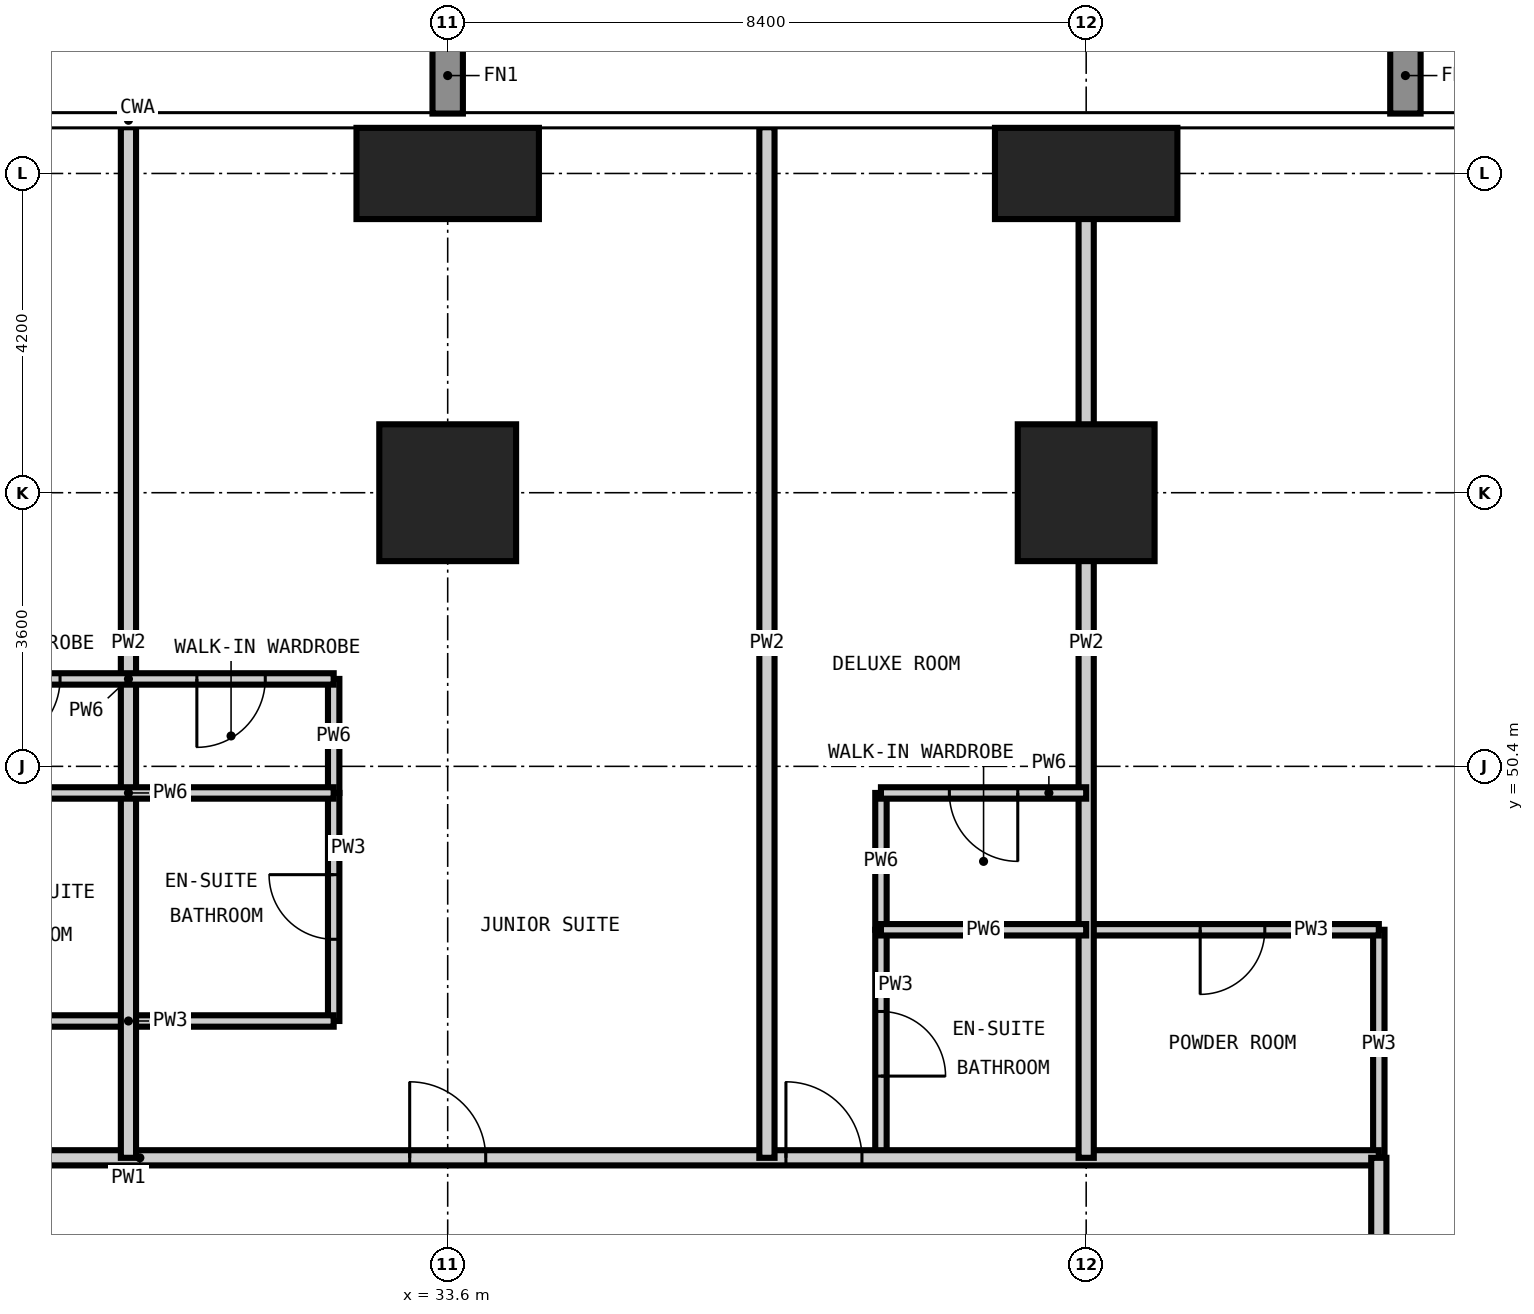
"""IFC4 building model, lengths in metres.
Left out: names, types, materials, properties, quantities, classifications, styles, units other than length and angle.
Written with IfcOpenShell. Run it as: python <this file> out.ifc"""

import sys

from ifc_helpers import new_model, si_unit, direction, frame, frame_2d, origin, origin_2d, place, context, subcontext, project, spatial, rectangle, extrude, element, fill, save


model = new_model("IFC4")
c1 = context("Model", 3, precision=1e-05, world=origin(), true_north=direction((0.0, 1.0)))
c2 = subcontext(c1, "Body", "Model", "MODEL_VIEW")
j1 = project(units=[si_unit("LENGTHUNIT", "METRE"), si_unit("PLANEANGLEUNIT", "RADIAN")], contexts=[c1])
p1 = place(None, origin())
s1 = spatial("IfcSite", under=j1, at=p1, CompositionType="ELEMENT")
p2 = place(p1, origin())
s2 = spatial("IfcBuilding", under=s1, at=p2, CompositionType="ELEMENT")
p3 = place(p2, frame((0.0, 0.0, 34.2)))
s3 = spatial("IfcBuildingStorey", under=s2, at=p3, CompositionType="ELEMENT", Elevation=34.2)
p4 = place(p3, frame((33.6, 54.0, -0.35), z_axis=(0.0, 0.0, 1.0), x_axis=(1.0, 0.0, 0.0)))
e1 = element("IfcColumn", 1, at=p4, inside=s3, PredefinedType="COLUMN", context=c2, shape_type="SweptSolid", body=[
    extrude(rectangle(XDim=1.8, YDim=1.8, at=origin_2d()), origin(), (0.0, 0.0, 1.0), 3.6),
])
p5 = place(p3, frame((33.6, 58.2, -0.35), z_axis=(0.0, 0.0, 1.0), x_axis=(1.0, 0.0, 0.0)))
e2 = element("IfcColumn", 2, at=p5, inside=s3, PredefinedType="COLUMN", context=c2, shape_type="SweptSolid", body=[
    extrude(rectangle(XDim=2.4, YDim=1.2, at=origin_2d()), origin(), (0.0, 0.0, 1.0), 3.6),
])
p6 = place(p3, frame((42.0, 54.0, -0.35), z_axis=(0.0, 0.0, 1.0), x_axis=(1.0, 0.0, 0.0)))
e3 = element("IfcColumn", 3, at=p6, inside=s3, PredefinedType="COLUMN", context=c2, shape_type="SweptSolid", body=[
    extrude(rectangle(XDim=1.8, YDim=1.8, at=origin_2d()), origin(), (0.0, 0.0, 1.0), 3.6),
])
p7 = place(p3, frame((42.0, 58.2, -0.35), z_axis=(0.0, 0.0, 1.0), x_axis=(1.0, 0.0, 0.0)))
e4 = element("IfcColumn", 4, at=p7, inside=s3, PredefinedType="COLUMN", context=c2, shape_type="SweptSolid", body=[
    extrude(rectangle(XDim=2.4, YDim=1.2, at=origin_2d()), origin(), (0.0, 0.0, 1.0), 3.6),
])
p8 = place(p3, frame((32.1, 47.05, 0.0), z_axis=(0.0, 0.0, 1.0), x_axis=(0.0, 1.0, 0.0)))
e5 = element("IfcWall", 5, at=p8, inside=s3, PredefinedType="PARTITIONING", context=c2, shape_type="SweptSolid", body=[
    extrude(rectangle(XDim=3.0, YDim=0.15, at=frame_2d((1.5, 0.0))), origin(), (0.0, 0.0, 1.0), 3.25),
])
p9 = place(p8, frame((1.075, 0.0, 0.0)))
e6 = element("IfcOpeningElement", 6, at=p9, cuts=e5, PredefinedType="OPENING", context=c2, shape_type="SweptSolid", body=[
    extrude(rectangle(XDim=0.85, YDim=2.1, at=frame_2d((0.425, 1.05))), frame((0.0, 0.085, 0.0), z_axis=(0.0, -1.0, 0.0), x_axis=(1.0, 0.0, 0.0)), (0.0, 0.0, 1.0), 0.17),
])
p10 = place(p3, frame((39.3, 45.25, 0.0), z_axis=(0.0, 0.0, 1.0), x_axis=(0.0, 1.0, 0.0)))
e7 = element("IfcWall", 7, at=p10, inside=s3, PredefinedType="PARTITIONING", context=c2, shape_type="SweptSolid", body=[
    extrude(rectangle(XDim=3.0, YDim=0.15, at=frame_2d((1.5, 0.0))), origin(), (0.0, 0.0, 1.0), 3.25),
])
p11 = place(p10, frame((1.075, 0.0, 0.0)))
e8 = element("IfcOpeningElement", 8, at=p11, cuts=e7, PredefinedType="OPENING", context=c2, shape_type="SweptSolid", body=[
    extrude(rectangle(XDim=0.85, YDim=2.1, at=frame_2d((0.425, 1.05))), frame((0.0, 0.085, 0.0), z_axis=(0.0, -1.0, 0.0), x_axis=(1.0, 0.0, 0.0)), (0.0, 0.0, 1.0), 0.17),
])
p12 = place(p3, frame((45.85, 45.25, 0.0), z_axis=(0.0, 0.0, 1.0), x_axis=(0.0, 1.0, 0.0)))
e9 = element("IfcWall", 9, at=p12, inside=s3, PredefinedType="PARTITIONING", context=c2, shape_type="SweptSolid", body=[
    extrude(rectangle(XDim=3.0, YDim=0.15, at=frame_2d((1.5, 0.0))), origin(), (0.0, 0.0, 1.0), 3.25),
])
p13 = place(p3, frame((26.7, 47.05, 0.0), z_axis=(0.0, 0.0, 1.0), x_axis=(1.0, 0.0, 0.0)))
e10 = element("IfcWall", 10, at=p13, inside=s3, PredefinedType="PARTITIONING", context=c2, shape_type="SweptSolid", body=[
    extrude(rectangle(XDim=5.4, YDim=0.15, at=frame_2d((2.7, 0.0))), origin(), (0.0, 0.0, 1.0), 3.25),
])
p14 = place(p3, frame((42.0, 48.25, 0.0), z_axis=(0.0, 0.0, 1.0), x_axis=(1.0, 0.0, 0.0)))
e11 = element("IfcWall", 11, at=p14, inside=s3, PredefinedType="PARTITIONING", context=c2, shape_type="SweptSolid", body=[
    extrude(rectangle(XDim=3.85, YDim=0.15, at=frame_2d((1.925, 0.0))), origin(), (0.0, 0.0, 1.0), 3.25),
])
p15 = place(p14, frame((1.5, 0.0, 0.0)))
e12 = element("IfcOpeningElement", 12, at=p15, cuts=e11, PredefinedType="OPENING", context=c2, shape_type="SweptSolid", body=[
    extrude(rectangle(XDim=0.85, YDim=2.1, at=frame_2d((0.425, 1.05))), frame((0.0, 0.085, 0.0), z_axis=(0.0, -1.0, 0.0), x_axis=(1.0, 0.0, 0.0)), (0.0, 0.0, 1.0), 0.17),
])
p16 = place(p3, frame((13.25, 45.25, 0.0), z_axis=(0.0, 0.0, 1.0), x_axis=(1.0, 0.0, 0.0)))
e13 = element("IfcWall", 13, at=p16, inside=s3, PredefinedType="PARTITIONING", context=c2, shape_type="SweptSolid", body=[
    extrude(rectangle(XDim=32.6, YDim=0.2, at=frame_2d((16.3, 0.0))), origin(), (0.0, 0.0, 1.0), 3.25),
])
p17 = place(p16, frame((6.5, 0.0, 0.0)))
e14 = element("IfcOpeningElement", 14, at=p17, cuts=e13, PredefinedType="OPENING", context=c2, shape_type="SweptSolid", body=[
    extrude(rectangle(XDim=1.0, YDim=2.2, at=frame_2d((0.5, 1.1))), frame((0.0, 0.11, 0.0), z_axis=(0.0, -1.0, 0.0), x_axis=(1.0, 0.0, 0.0)), (0.0, 0.0, 1.0), 0.22),
])
p18 = place(p16, frame((11.45, 0.0, 0.0)))
e15 = element("IfcOpeningElement", 15, at=p18, cuts=e13, PredefinedType="OPENING", context=c2, shape_type="SweptSolid", body=[
    extrude(rectangle(XDim=1.0, YDim=2.2, at=frame_2d((0.5, 1.1))), frame((0.0, 0.11, 0.0), z_axis=(0.0, -1.0, 0.0), x_axis=(1.0, 0.0, 0.0)), (0.0, 0.0, 1.0), 0.22),
])
p19 = place(p16, frame((19.85, 0.0, 0.0)))
e16 = element("IfcOpeningElement", 16, at=p19, cuts=e13, PredefinedType="OPENING", context=c2, shape_type="SweptSolid", body=[
    extrude(rectangle(XDim=1.0, YDim=2.2, at=frame_2d((0.5, 1.1))), frame((0.0, 0.11, 0.0), z_axis=(0.0, -1.0, 0.0), x_axis=(1.0, 0.0, 0.0)), (0.0, 0.0, 1.0), 0.22),
])
p20 = place(p16, frame((24.8, 0.0, 0.0)))
e17 = element("IfcOpeningElement", 17, at=p20, cuts=e13, PredefinedType="OPENING", context=c2, shape_type="SweptSolid", body=[
    extrude(rectangle(XDim=1.0, YDim=2.2, at=frame_2d((0.5, 1.1))), frame((0.0, 0.11, 0.0), z_axis=(0.0, -1.0, 0.0), x_axis=(1.0, 0.0, 0.0)), (0.0, 0.0, 1.0), 0.22),
])
p21 = place(p3, frame((45.85, 45.25, 0.0), z_axis=(0.0, 0.0, 1.0), x_axis=(0.0, -1.0, 0.0)))
e18 = element("IfcWall", 18, at=p21, inside=s3, PredefinedType="PARTITIONING", context=c2, shape_type="SweptSolid", body=[
    extrude(rectangle(XDim=32.0, YDim=0.2, at=frame_2d((16.0, 0.0))), origin(), (0.0, 0.0, 1.0), 3.25),
])
p22 = place(p21, frame((23.75, 0.0, 0.0)))
e19 = element("IfcOpeningElement", 19, at=p22, cuts=e18, PredefinedType="OPENING", context=c2, shape_type="SweptSolid", body=[
    extrude(rectangle(XDim=1.0, YDim=2.2, at=frame_2d((0.5, 1.1))), frame((0.0, 0.11, 0.0), z_axis=(0.0, -1.0, 0.0), x_axis=(1.0, 0.0, 0.0)), (0.0, 0.0, 1.0), 0.22),
])
p23 = place(p21, frame((15.35, 0.0, 0.0)))
e20 = element("IfcOpeningElement", 20, at=p23, cuts=e18, PredefinedType="OPENING", context=c2, shape_type="SweptSolid", body=[
    extrude(rectangle(XDim=1.0, YDim=2.2, at=frame_2d((0.5, 1.1))), frame((0.0, 0.11, 0.0), z_axis=(0.0, -1.0, 0.0), x_axis=(1.0, 0.0, 0.0)), (0.0, 0.0, 1.0), 0.22),
])
p24 = place(p21, frame((6.95, 0.0, 0.0)))
e21 = element("IfcOpeningElement", 21, at=p24, cuts=e18, PredefinedType="OPENING", context=c2, shape_type="SweptSolid", body=[
    extrude(rectangle(XDim=1.0, YDim=2.2, at=frame_2d((0.5, 1.1))), frame((0.0, 0.11, 0.0), z_axis=(0.0, -1.0, 0.0), x_axis=(1.0, 0.0, 0.0)), (0.0, 0.0, 1.0), 0.22),
])
p25 = place(p21, frame((29.725, 0.0, 0.0)))
e22 = element("IfcOpeningElement", 22, at=p25, cuts=e18, PredefinedType="OPENING", context=c2, shape_type="SweptSolid", body=[
    extrude(rectangle(XDim=1.0, YDim=2.2, at=frame_2d((0.5, 1.1))), frame((0.0, 0.11, 0.0), z_axis=(0.0, -1.0, 0.0), x_axis=(1.0, 0.0, 0.0)), (0.0, 0.0, 1.0), 0.22),
])
p26 = place(p21, frame((1.125, 0.0, 0.0)))
e23 = element("IfcOpeningElement", 23, at=p26, cuts=e18, PredefinedType="OPENING", context=c2, shape_type="SweptSolid", body=[
    extrude(rectangle(XDim=1.0, YDim=2.2, at=frame_2d((0.5, 1.1))), frame((0.0, 0.11, 0.0), z_axis=(0.0, -1.0, 0.0), x_axis=(1.0, 0.0, 0.0)), (0.0, 0.0, 1.0), 0.22),
])
for number, where, z_axis, x_axis in (
    (24, (29.4, 45.25, 0.0), (0.0, 0.0, 1.0), (0.0, 1.0, 0.0)),
    (25, (37.8, 45.25, 0.0), (0.0, 0.0, 1.0), (0.0, 1.0, 0.0)),
    (26, (42.0, 45.25, 0.0), (0.0, 0.0, 1.0), (0.0, 1.0, 0.0)),
):
    element("IfcWall", number, at=place(p3, frame(where, z_axis=z_axis, x_axis=x_axis)), inside=s3, PredefinedType="PARTITIONING", context=c2, shape_type="SweptSolid", body=[
        extrude(rectangle(XDim=13.558, YDim=0.2, at=frame_2d((6.779, 0.0))), origin(), (0.0, 0.0, 1.0), 3.25),
    ])
p27 = place(p3, frame((32.1, 50.05, 0.0), z_axis=(0.0, 0.0, 1.0), x_axis=(0.0, 1.0, 0.0)))
e27 = element("IfcWall", 27, at=p27, inside=s3, PredefinedType="PARTITIONING", context=c2, shape_type="SweptSolid", body=[
    extrude(rectangle(XDim=1.5, YDim=0.15, at=frame_2d((0.75, 0.0))), origin(), (0.0, 0.0, 1.0), 3.25),
])
p28 = place(p3, frame((39.3, 48.25, 0.0), z_axis=(0.0, 0.0, 1.0), x_axis=(0.0, 1.0, 0.0)))
e28 = element("IfcWall", 28, at=p28, inside=s3, PredefinedType="PARTITIONING", context=c2, shape_type="SweptSolid", body=[
    extrude(rectangle(XDim=1.8, YDim=0.15, at=frame_2d((0.9, 0.0))), origin(), (0.0, 0.0, 1.0), 3.25),
])
p29 = place(p3, frame((39.3, 48.25, 0.0), z_axis=(0.0, 0.0, 1.0), x_axis=(1.0, 0.0, 0.0)))
e29 = element("IfcWall", 29, at=p29, inside=s3, PredefinedType="PARTITIONING", context=c2, shape_type="SweptSolid", body=[
    extrude(rectangle(XDim=2.7, YDim=0.15, at=frame_2d((1.35, 0.0))), origin(), (0.0, 0.0, 1.0), 3.25),
])
p30 = place(p3, frame((26.7, 50.05, 0.0), z_axis=(0.0, 0.0, 1.0), x_axis=(1.0, 0.0, 0.0)))
e30 = element("IfcWall", 30, at=p30, inside=s3, PredefinedType="PARTITIONING", context=c2, shape_type="SweptSolid", body=[
    extrude(rectangle(XDim=5.4, YDim=0.15, at=frame_2d((2.7, 0.0))), origin(), (0.0, 0.0, 1.0), 3.25),
])
p31 = place(p3, frame((39.3, 50.05, 0.0), z_axis=(0.0, 0.0, 1.0), x_axis=(1.0, 0.0, 0.0)))
e31 = element("IfcWall", 31, at=p31, inside=s3, PredefinedType="PARTITIONING", context=c2, shape_type="SweptSolid", body=[
    extrude(rectangle(XDim=2.7, YDim=0.15, at=frame_2d((1.35, 0.0))), origin(), (0.0, 0.0, 1.0), 3.25),
])
p32 = place(p31, frame((0.9, 0.0, 0.0)))
e32 = element("IfcOpeningElement", 32, at=p32, cuts=e31, PredefinedType="OPENING", context=c2, shape_type="SweptSolid", body=[
    extrude(rectangle(XDim=0.9, YDim=2.1, at=frame_2d((0.45, 1.05))), frame((0.0, 0.085, 0.0), z_axis=(0.0, -1.0, 0.0), x_axis=(1.0, 0.0, 0.0)), (0.0, 0.0, 1.0), 0.17),
])
p33 = place(p3, frame((26.7, 51.55, 0.0), z_axis=(0.0, 0.0, 1.0), x_axis=(1.0, 0.0, 0.0)))
e33 = element("IfcWall", 33, at=p33, inside=s3, PredefinedType="PARTITIONING", context=c2, shape_type="SweptSolid", body=[
    extrude(rectangle(XDim=5.4, YDim=0.15, at=frame_2d((2.7, 0.0))), origin(), (0.0, 0.0, 1.0), 3.25),
])
p34 = place(p33, frame((0.9, 0.0, 0.0)))
e34 = element("IfcOpeningElement", 34, at=p34, cuts=e33, PredefinedType="OPENING", context=c2, shape_type="SweptSolid", body=[
    extrude(rectangle(XDim=0.9, YDim=2.1, at=frame_2d((0.45, 1.05))), frame((0.0, 0.085, 0.0), z_axis=(0.0, -1.0, 0.0), x_axis=(1.0, 0.0, 0.0)), (0.0, 0.0, 1.0), 0.17),
])
p35 = place(p33, frame((3.6, 0.0, 0.0)))
e35 = element("IfcOpeningElement", 35, at=p35, cuts=e33, PredefinedType="OPENING", context=c2, shape_type="SweptSolid", body=[
    extrude(rectangle(XDim=0.9, YDim=2.1, at=frame_2d((0.45, 1.05))), frame((0.0, 0.085, 0.0), z_axis=(0.0, -1.0, 0.0), x_axis=(1.0, 0.0, 0.0)), (0.0, 0.0, 1.0), 0.17),
])
p36 = place(p34, frame((0.9, 0.0, 0.0), z_axis=(0.0, 0.0, 1.0), x_axis=(-1.0, 0.0, 0.0)))
e36 = element("IfcDoor", 36, at=p36, inside=s3, OperationType="SINGLE_SWING_RIGHT", PredefinedType="DOOR", context=c2, shape_type="SweptSolid", body=[
    extrude(rectangle(XDim=0.9, YDim=2.1, at=frame_2d((0.45, 1.05))), frame((0.0, 0.025, 0.0), z_axis=(0.0, -1.0, 0.0), x_axis=(1.0, 0.0, 0.0)), (0.0, 0.0, 1.0), 0.05),
])
fill(e34, e36)
p37 = place(p19, origin())
e37 = element("IfcDoor", 37, at=p37, inside=s3, OperationType="SINGLE_SWING_LEFT", PredefinedType="DOOR", context=c2, shape_type="SweptSolid", body=[
    extrude(rectangle(XDim=1.0, YDim=2.2, at=frame_2d((0.5, 1.1))), frame((0.0, 0.025, 0.0), z_axis=(0.0, -1.0, 0.0), x_axis=(1.0, 0.0, 0.0)), (0.0, 0.0, 1.0), 0.05),
])
fill(e16, e37)
p38 = place(p9, origin())
e38 = element("IfcDoor", 38, at=p38, inside=s3, OperationType="SINGLE_SWING_RIGHT", PredefinedType="DOOR", context=c2, shape_type="SweptSolid", body=[
    extrude(rectangle(XDim=0.85, YDim=2.1, at=frame_2d((0.425, 1.05))), frame((0.0, 0.025, 0.0), z_axis=(0.0, -1.0, 0.0), x_axis=(1.0, 0.0, 0.0)), (0.0, 0.0, 1.0), 0.05),
])
fill(e6, e38)
p39 = place(p35, frame((0.9, 0.0, 0.0), z_axis=(0.0, 0.0, 1.0), x_axis=(-1.0, 0.0, 0.0)))
e39 = element("IfcDoor", 39, at=p39, inside=s3, OperationType="SINGLE_SWING_RIGHT", PredefinedType="DOOR", context=c2, shape_type="SweptSolid", body=[
    extrude(rectangle(XDim=0.9, YDim=2.1, at=frame_2d((0.45, 1.05))), frame((0.0, 0.025, 0.0), z_axis=(0.0, -1.0, 0.0), x_axis=(1.0, 0.0, 0.0)), (0.0, 0.0, 1.0), 0.05),
])
fill(e35, e39)
p40 = place(p20, origin())
e40 = element("IfcDoor", 40, at=p40, inside=s3, OperationType="SINGLE_SWING_LEFT", PredefinedType="DOOR", context=c2, shape_type="SweptSolid", body=[
    extrude(rectangle(XDim=1.0, YDim=2.2, at=frame_2d((0.5, 1.1))), frame((0.0, 0.025, 0.0), z_axis=(0.0, -1.0, 0.0), x_axis=(1.0, 0.0, 0.0)), (0.0, 0.0, 1.0), 0.05),
])
fill(e17, e40)
p41 = place(p11, frame((0.85, 0.0, 0.0), z_axis=(0.0, 0.0, 1.0), x_axis=(-1.0, 0.0, 0.0)))
e41 = element("IfcDoor", 41, at=p41, inside=s3, OperationType="SINGLE_SWING_RIGHT", PredefinedType="DOOR", context=c2, shape_type="SweptSolid", body=[
    extrude(rectangle(XDim=0.85, YDim=2.1, at=frame_2d((0.425, 1.05))), frame((0.0, 0.025, 0.0), z_axis=(0.0, -1.0, 0.0), x_axis=(1.0, 0.0, 0.0)), (0.0, 0.0, 1.0), 0.05),
])
fill(e8, e41)
p42 = place(p32, frame((0.9, 0.0, 0.0), z_axis=(0.0, 0.0, 1.0), x_axis=(-1.0, 0.0, 0.0)))
e42 = element("IfcDoor", 42, at=p42, inside=s3, OperationType="SINGLE_SWING_LEFT", PredefinedType="DOOR", context=c2, shape_type="SweptSolid", body=[
    extrude(rectangle(XDim=0.9, YDim=2.1, at=frame_2d((0.45, 1.05))), frame((0.0, 0.025, 0.0), z_axis=(0.0, -1.0, 0.0), x_axis=(1.0, 0.0, 0.0)), (0.0, 0.0, 1.0), 0.05),
])
fill(e32, e42)
p43 = place(p15, frame((0.85, 0.0, 0.0), z_axis=(0.0, 0.0, 1.0), x_axis=(-1.0, 0.0, 0.0)))
e43 = element("IfcDoor", 43, at=p43, inside=s3, OperationType="SINGLE_SWING_RIGHT", PredefinedType="DOOR", context=c2, shape_type="SweptSolid", body=[
    extrude(rectangle(XDim=0.85, YDim=2.1, at=frame_2d((0.425, 1.05))), frame((0.0, 0.025, 0.0), z_axis=(0.0, -1.0, 0.0), x_axis=(1.0, 0.0, 0.0)), (0.0, 0.0, 1.0), 0.05),
])
fill(e12, e43)
save(model, sys.argv[1])
